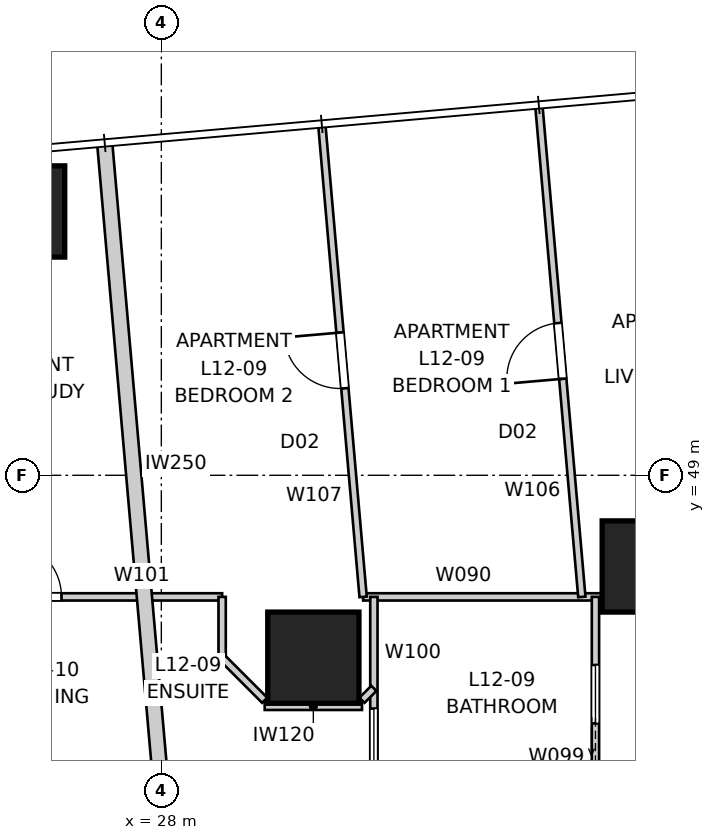
"""IFC4 building model, lengths in metres.
Left out: names, types, materials, properties, quantities, classifications, styles, units other than length and angle.
Written with IfcOpenShell. Run it as: python <this file> out.ifc"""

import sys

from ifc_helpers import new_model, si_unit, direction, frame, frame_2d, origin, origin_2d, place, context, subcontext, project, spatial, rectangle, extrude, element, fill, save


model = new_model("IFC4")
c1 = context("Model", 3, precision=1e-05, world=origin(), true_north=direction((0.0, 1.0)))
c2 = subcontext(c1, "Body", "Model", "MODEL_VIEW")
j1 = project(units=[si_unit("LENGTHUNIT", "METRE"), si_unit("PLANEANGLEUNIT", "RADIAN")], contexts=[c1])
p1 = place(None, origin())
s1 = spatial("IfcSite", under=j1, at=p1, CompositionType="ELEMENT")
p2 = place(p1, origin())
s2 = spatial("IfcBuilding", under=s1, at=p2, CompositionType="ELEMENT")
p3 = place(p2, frame((0.0, 0.0, 47.2)))
s3 = spatial("IfcBuildingStorey", under=s2, at=p3, CompositionType="ELEMENT", Elevation=47.2)
p4 = place(p3, frame((25.661, 53.339, -0.15), z_axis=(0.0, 0.0, 1.0), x_axis=(1.0, 0.0, 0.0)))
e1 = element("IfcColumn", 1, at=p4, inside=s3, PredefinedType="COLUMN", context=c2, shape_type="SweptSolid", body=[
    extrude(rectangle(XDim=1.5, YDim=1.5, at=origin_2d()), origin(), (0.0, 0.0, 1.0), 3.55),
])
for number, where, z_axis, x_axis in (
    (2, (36.0, 47.5, 0.0), (0.0, 0.0, 1.0), (1.0, 0.0, 0.0)),
    (3, (30.5, 46.0, 0.0), (0.0, 0.0, 1.0), (1.0, 0.0, 0.0)),
):
    element("IfcColumn", number, at=place(p3, frame(where, z_axis=z_axis, x_axis=x_axis)), inside=s3, PredefinedType="COLUMN", context=c2, shape_type="SweptSolid", body=[
        extrude(rectangle(XDim=1.5, YDim=1.5, at=origin_2d()), origin(), (0.0, 0.0, 1.0), 3.4),
    ])
p5 = place(p3, frame((27.068, 54.466, 0.0), z_axis=(0.0, 0.0, 1.0), x_axis=(0.08716441141, -0.996193939644, 0.0)))
e4 = element("IfcWall", 4, at=p5, inside=s3, PredefinedType="PARTITIONING", context=c2, shape_type="SweptSolid", body=[
    extrude(rectangle(XDim=10.736, YDim=0.25, at=frame_2d((5.368, 0.0))), origin(), (0.0, 0.0, 1.0), 3.25),
])
p6 = place(p3, frame((31.319, 47.0, 0.0), z_axis=(0.0, 0.0, 1.0), x_axis=(1.0, 0.0, 0.0)))
e5 = element("IfcWall", 5, at=p6, inside=s3, PredefinedType="PARTITIONING", context=c2, shape_type="SweptSolid", body=[
    extrude(rectangle(XDim=25.681, YDim=0.12, at=frame_2d((12.841, 0.0))), origin(), (0.0, 0.0, 1.0), 2.55),
])
p7 = place(p6, frame((15.701, 0.0, 0.0)))
e6 = element("IfcOpeningElement", 6, at=p7, cuts=e5, PredefinedType="OPENING", context=c2, shape_type="SweptSolid", body=[
    extrude(rectangle(XDim=0.92, YDim=2.34, at=frame_2d((0.46, 1.17))), frame((0.0, 0.07, 0.0), z_axis=(0.0, -1.0, 0.0), x_axis=(1.0, 0.0, 0.0)), (0.0, 0.0, 1.0), 0.14),
])
p8 = place(p6, frame((19.676, 0.0, 0.0)))
e7 = element("IfcOpeningElement", 7, at=p8, cuts=e5, PredefinedType="OPENING", context=c2, shape_type="SweptSolid", body=[
    extrude(rectangle(XDim=0.92, YDim=2.34, at=frame_2d((0.46, 1.17))), frame((0.0, 0.07, 0.0), z_axis=(0.0, -1.0, 0.0), x_axis=(1.0, 0.0, 0.0)), (0.0, 0.0, 1.0), 0.14),
])
p9 = place(p6, frame((5.498, 0.0, 0.0)))
e8 = element("IfcOpeningElement", 8, at=p9, cuts=e5, PredefinedType="OPENING", context=c2, shape_type="SweptSolid", body=[
    extrude(rectangle(XDim=0.92, YDim=2.34, at=frame_2d((0.46, 1.17))), frame((0.0, 0.07, 0.0), z_axis=(0.0, -1.0, 0.0), x_axis=(1.0, 0.0, 0.0)), (0.0, 0.0, 1.0), 0.14),
])
p10 = place(p6, frame((8.11, 0.0, 0.0)))
e9 = element("IfcOpeningElement", 9, at=p10, cuts=e5, PredefinedType="OPENING", context=c2, shape_type="SweptSolid", body=[
    extrude(rectangle(XDim=0.96, YDim=2.1, at=frame_2d((0.48, 1.05))), frame((0.0, 0.07, 0.0), z_axis=(0.0, -1.0, 0.0), x_axis=(1.0, 0.0, 0.0)), (0.0, 0.0, 1.0), 0.14),
])
p11 = place(p3, frame((35.14, 43.8, 0.0), z_axis=(0.0, 0.0, 1.0), x_axis=(0.0, 1.0, 0.0)))
e10 = element("IfcWall", 10, at=p11, inside=s3, PredefinedType="PARTITIONING", context=c2, shape_type="SweptSolid", body=[
    extrude(rectangle(XDim=3.2, YDim=0.12, at=frame_2d((1.6, 0.0))), origin(), (0.0, 0.0, 1.0), 3.25),
])
p12 = place(p11, frame((1.12, 0.0, 0.0)))
e11 = element("IfcOpeningElement", 11, at=p12, cuts=e10, PredefinedType="OPENING", context=c2, shape_type="SweptSolid", body=[
    extrude(rectangle(XDim=0.96, YDim=2.1, at=frame_2d((0.48, 1.05))), frame((0.0, 0.07, 0.0), z_axis=(0.0, -1.0, 0.0), x_axis=(1.0, 0.0, 0.0)), (0.0, 0.0, 1.0), 0.14),
])
p13 = place(p3, frame((31.496, 43.8, 0.0), z_axis=(0.0, 0.0, 1.0), x_axis=(0.0, 1.0, 0.0)))
e12 = element("IfcWall", 12, at=p13, inside=s3, PredefinedType="PARTITIONING", context=c2, shape_type="SweptSolid", body=[
    extrude(rectangle(XDim=3.2, YDim=0.12, at=frame_2d((1.6, 0.0))), origin(), (0.0, 0.0, 1.0), 3.25),
])
p14 = place(p13, frame((0.403, 0.0, 0.0)))
e13 = element("IfcOpeningElement", 13, at=p14, cuts=e12, PredefinedType="OPENING", context=c2, shape_type="SweptSolid", body=[
    extrude(rectangle(XDim=0.96, YDim=2.1, at=frame_2d((0.48, 1.05))), frame((0.0, 0.07, 0.0), z_axis=(0.0, -1.0, 0.0), x_axis=(1.0, 0.0, 0.0)), (0.0, 0.0, 1.0), 0.14),
])
p15 = place(p3, frame((23.0, 47.0, 0.0), z_axis=(0.0, 0.0, 1.0), x_axis=(1.0, 0.0, 0.0)))
e14 = element("IfcWall", 14, at=p15, inside=s3, PredefinedType="PARTITIONING", context=c2, shape_type="SweptSolid", body=[
    extrude(rectangle(XDim=6.0, YDim=0.12, at=frame_2d((3.0, 0.0))), origin(), (0.0, 0.0, 1.0), 3.25),
])
p16 = place(p15, frame((2.438, 0.0, 0.0)))
e15 = element("IfcOpeningElement", 15, at=p16, cuts=e14, PredefinedType="OPENING", context=c2, shape_type="SweptSolid", body=[
    extrude(rectangle(XDim=0.92, YDim=2.34, at=frame_2d((0.46, 1.17))), frame((0.0, 0.07, 0.0), z_axis=(0.0, -1.0, 0.0), x_axis=(1.0, 0.0, 0.0)), (0.0, 0.0, 1.0), 0.14),
])
p17 = place(p3, frame((29.0, 47.0, 0.0), z_axis=(0.0, 0.0, 1.0), x_axis=(0.0, -1.0, 0.0)))
e16 = element("IfcWall", 16, at=p17, inside=s3, PredefinedType="PARTITIONING", context=c2, shape_type="SweptSolid", body=[
    extrude(rectangle(XDim=1.0, YDim=0.12, at=frame_2d((0.5, 0.0))), origin(), (0.0, 0.0, 1.0), 3.25),
])
p18 = place(p3, frame((29.0, 46.0, 0.0), z_axis=(0.0, 0.0, 1.0), x_axis=(0.707106781187, -0.707106781187, 0.0)))
e17 = element("IfcWall", 17, at=p18, inside=s3, PredefinedType="PARTITIONING", context=c2, shape_type="SweptSolid", body=[
    extrude(rectangle(XDim=0.99, YDim=0.12, at=frame_2d((0.495, 0.0))), origin(), (0.0, 0.0, 1.0), 3.25),
])
p19 = place(p3, frame((29.7, 45.2, 0.0), z_axis=(0.0, 0.0, 1.0), x_axis=(1.0, 0.0, 0.0)))
e18 = element("IfcWall", 18, at=p19, inside=s3, PredefinedType="PARTITIONING", context=c2, shape_type="SweptSolid", body=[
    extrude(rectangle(XDim=1.6, YDim=0.12, at=frame_2d((0.8, 0.0))), origin(), (0.0, 0.0, 1.0), 3.25),
])
p20 = place(p3, frame((31.3, 45.3, 0.0), z_axis=(0.0, 0.0, 1.0), x_axis=(0.707106781187, 0.707106781187, 0.0)))
e19 = element("IfcWall", 19, at=p20, inside=s3, PredefinedType="PARTITIONING", context=c2, shape_type="SweptSolid", body=[
    extrude(rectangle(XDim=0.277, YDim=0.12, at=frame_2d((0.138, 0.0))), origin(), (0.0, 0.0, 1.0), 3.25),
])
p21 = place(p3, frame((34.916, 47.0, 0.0), z_axis=(0.0, 0.0, 1.0), x_axis=(-0.087184938313, 0.99619214338, 0.0)))
e20 = element("IfcWall", 20, at=p21, inside=s3, PredefinedType="PARTITIONING", context=c2, shape_type="SweptSolid", body=[
    extrude(rectangle(XDim=8.082, YDim=0.12, at=frame_2d((4.041, 0.0))), origin(), (0.0, 0.0, 1.0), 3.25),
])
p22 = place(p21, frame((3.601, 0.0, 0.0)))
e21 = element("IfcOpeningElement", 21, at=p22, cuts=e20, PredefinedType="OPENING", context=c2, shape_type="SweptSolid", body=[
    extrude(rectangle(XDim=0.92, YDim=2.34, at=frame_2d((0.46, 1.17))), frame((0.0, 0.07, 0.0), z_axis=(0.0, -1.0, 0.0), x_axis=(1.0, 0.0, 0.0)), (0.0, 0.0, 1.0), 0.14),
])
p23 = place(p3, frame((31.319, 47.0, 0.0), z_axis=(0.0, 0.0, 1.0), x_axis=(-0.0871517452, 0.996195047824, 0.0)))
e22 = element("IfcWall", 22, at=p23, inside=s3, PredefinedType="PARTITIONING", context=c2, shape_type="SweptSolid", body=[
    extrude(rectangle(XDim=7.768, YDim=0.12, at=frame_2d((3.884, 0.0))), origin(), (0.0, 0.0, 1.0), 3.25),
])
p24 = place(p23, frame((3.444, 0.0, 0.0)))
e23 = element("IfcOpeningElement", 23, at=p24, cuts=e22, PredefinedType="OPENING", context=c2, shape_type="SweptSolid", body=[
    extrude(rectangle(XDim=0.92, YDim=2.34, at=frame_2d((0.46, 1.17))), frame((0.0, 0.07, 0.0), z_axis=(0.0, -1.0, 0.0), x_axis=(1.0, 0.0, 0.0)), (0.0, 0.0, 1.0), 0.14),
])
p25 = place(p12, origin())
e24 = element("IfcDoor", 24, at=p25, inside=s3, OperationType="SLIDING_TO_LEFT", PredefinedType="DOOR", context=c2, shape_type="SweptSolid", body=[
    extrude(rectangle(XDim=0.96, YDim=2.1, at=frame_2d((0.48, 1.05))), frame((0.0, 0.025, 0.0), z_axis=(0.0, -1.0, 0.0), x_axis=(1.0, 0.0, 0.0)), (0.0, 0.0, 1.0), 0.05),
])
fill(e11, e24)
p26 = place(p16, origin())
e25 = element("IfcDoor", 25, at=p26, inside=s3, OperationType="SINGLE_SWING_LEFT", PredefinedType="DOOR", context=c2, shape_type="SweptSolid", body=[
    extrude(rectangle(XDim=0.92, YDim=2.34, at=frame_2d((0.46, 1.17))), frame((0.0, 0.025, 0.0), z_axis=(0.0, -1.0, 0.0), x_axis=(1.0, 0.0, 0.0)), (0.0, 0.0, 1.0), 0.05),
])
fill(e15, e25)
p27 = place(p22, origin())
e26 = element("IfcDoor", 26, at=p27, inside=s3, OperationType="SINGLE_SWING_LEFT", PredefinedType="DOOR", context=c2, shape_type="SweptSolid", body=[
    extrude(rectangle(XDim=0.92, YDim=2.34, at=frame_2d((0.46, 1.17))), frame((0.0, 0.025, 0.0), z_axis=(0.0, -1.0, 0.0), x_axis=(1.0, 0.0, 0.0)), (0.0, 0.0, 1.0), 0.05),
])
fill(e21, e26)
p28 = place(p14, origin())
e27 = element("IfcDoor", 27, at=p28, inside=s3, OperationType="SLIDING_TO_LEFT", PredefinedType="DOOR", context=c2, shape_type="SweptSolid", body=[
    extrude(rectangle(XDim=0.96, YDim=2.1, at=frame_2d((0.48, 1.05))), frame((0.0, 0.025, 0.0), z_axis=(0.0, -1.0, 0.0), x_axis=(1.0, 0.0, 0.0)), (0.0, 0.0, 1.0), 0.05),
])
fill(e13, e27)
p29 = place(p24, origin())
e28 = element("IfcDoor", 28, at=p29, inside=s3, OperationType="SINGLE_SWING_RIGHT", PredefinedType="DOOR", context=c2, shape_type="SweptSolid", body=[
    extrude(rectangle(XDim=0.92, YDim=2.34, at=frame_2d((0.46, 1.17))), frame((0.0, 0.025, 0.0), z_axis=(0.0, -1.0, 0.0), x_axis=(1.0, 0.0, 0.0)), (0.0, 0.0, 1.0), 0.05),
])
fill(e23, e28)
save(model, sys.argv[1])
